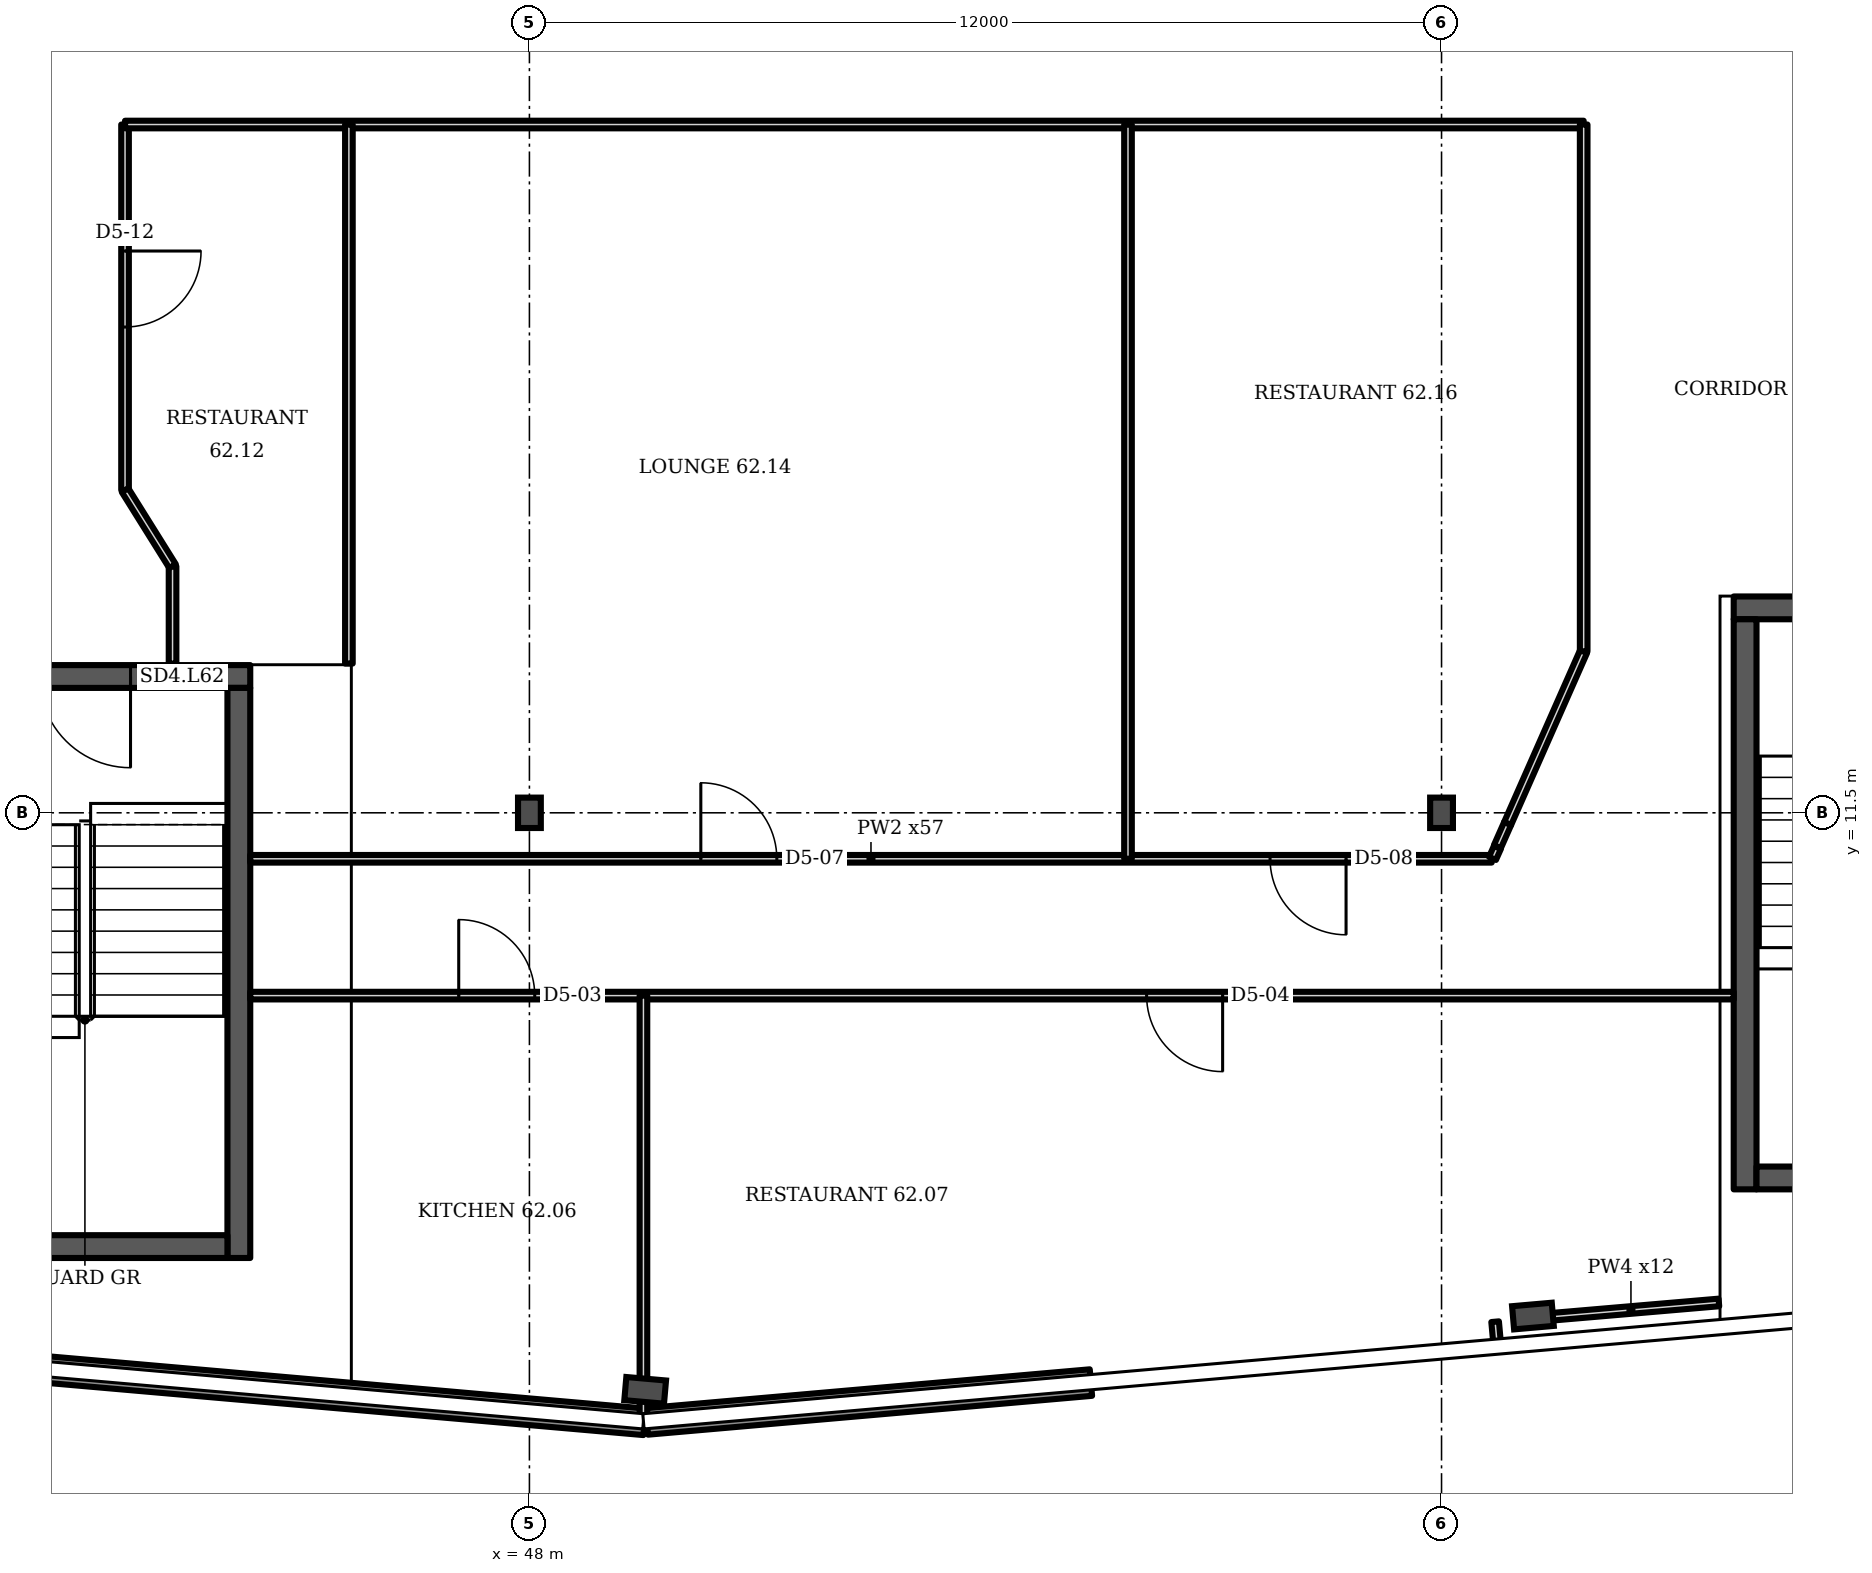
"""IFC4 building model, lengths in metres.
Left out: names, types, materials, properties, quantities, classifications, styles, units other than length and angle.
Written with IfcOpenShell. Run it as: python <this file> out.ifc"""

import sys

from ifc_helpers import new_model, si_unit, direction, frame, frame_2d, origin, origin_2d, place, context, subcontext, project, spatial, rectangle, i_section, extrude, element, fill, save


model = new_model("IFC4")
c1 = context("Model", 3, precision=1e-05, world=origin(), true_north=direction((0.0, 1.0)))
c2 = subcontext(c1, "Body", "Model", "MODEL_VIEW")
j1 = project(units=[si_unit("LENGTHUNIT", "METRE"), si_unit("PLANEANGLEUNIT", "RADIAN")], contexts=[c1])
p1 = place(None, origin())
s1 = spatial("IfcSite", under=j1, at=p1, CompositionType="ELEMENT")
p2 = place(p1, origin())
s2 = spatial("IfcBuilding", under=s1, at=p2, CompositionType="ELEMENT")
p3 = place(p2, frame((0.0, 0.0, 246.7)))
s3 = spatial("IfcBuildingStorey", under=s2, at=p3, CompositionType="ELEMENT", Elevation=246.7)
for number, where, z_axis, x_axis in (
    (1, (49.523, 3.902, 0.0), (0.0, 0.0, 1.0), (-0.087, -0.996, 0.0)),
    (2, (61.202, 4.879, 0.0), (0.0, 0.0, 1.0), (0.087, -0.996, 0.0)),
):
    element("IfcColumn", number, at=place(p3, frame(where, z_axis=z_axis, x_axis=x_axis)), inside=s3, PredefinedType="COLUMN", context=c2, shape_type="SweptSolid", body=[
        extrude(i_section(OverallWidth=0.306, OverallDepth=0.524, WebThickness=0.021, FlangeThickness=0.04, FilletRadius=0.027, at=origin_2d()), origin(), (0.0, 0.0, 1.0), 3.6),
    ])
for number, where, z_axis, x_axis in (
    (3, (48.0, 11.5, 0.0), (0.0, 0.0, 1.0), (1.0, 0.0, 0.0)),
    (4, (60.0, 11.5, 0.0), (0.0, 0.0, 1.0), (1.0, 0.0, 0.0)),
):
    element("IfcColumn", number, at=place(p3, frame(where, z_axis=z_axis, x_axis=x_axis)), inside=s3, PredefinedType="COLUMN", context=c2, shape_type="SweptSolid", body=[
        extrude(i_section(OverallWidth=0.3, OverallDepth=0.4, WebThickness=0.013, FlangeThickness=0.024, FilletRadius=0.027, at=origin_2d()), origin(), (0.0, 0.0, 1.0), 3.6),
    ])
p4 = place(p3, frame((37.729, 4.519, 0.0), z_axis=(0.0, 0.0, 1.0), x_axis=(0.99619, -0.087167, 0.0)))
e5 = element("IfcWall", 5, at=p4, inside=s3, PredefinedType="SOLIDWALL", context=c2, shape_type="SweptSolid", body=[
    extrude(rectangle(XDim=11.831, YDim=0.35, at=frame_2d((5.915, 0.0))), origin(), (0.0, 0.0, 1.0), 1.0),
])
p5 = place(p3, frame((49.545, 3.493, 0.0), z_axis=(0.0, 0.0, 1.0), x_axis=(0.996196, 0.087138, 0.0)))
e6 = element("IfcWall", 6, at=p5, inside=s3, PredefinedType="SOLIDWALL", context=c2, shape_type="SweptSolid", body=[
    extrude(rectangle(XDim=5.864, YDim=0.35, at=frame_2d((2.932, 0.0))), origin(), (0.0, 0.0, 1.0), 1.0),
])
p6 = place(p3, frame((39.977, 13.293, 0.0), z_axis=(0.0, 0.0, 1.0), x_axis=(1.0, 0.0, 0.0)))
e7 = element("IfcWall", 7, at=p6, inside=s3, PredefinedType="SHEAR", context=c2, shape_type="SweptSolid", body=[
    extrude(rectangle(XDim=4.35, YDim=0.3, at=frame_2d((2.175, 0.0))), origin(), (0.0, 0.0, 1.0), 3.2),
])
p7 = place(p6, frame((1.575, 0.0, 0.0)))
e8 = element("IfcOpeningElement", 8, at=p7, cuts=e7, PredefinedType="OPENING", context=c2, shape_type="SweptSolid", body=[
    extrude(rectangle(XDim=1.2, YDim=2.1, at=frame_2d((0.6, 1.05))), frame((0.0, 0.16, 0.0), z_axis=(0.0, -1.0, 0.0), x_axis=(1.0, 0.0, 0.0)), (0.0, 0.0, 1.0), 0.32),
])
p8 = place(p3, frame((63.844, 14.196, 0.0), z_axis=(0.0, 0.0, 1.0), x_axis=(1.0, 0.0, 0.0)))
e9 = element("IfcWall", 9, at=p8, inside=s3, PredefinedType="SHEAR", context=c2, shape_type="SweptSolid", body=[
    extrude(rectangle(XDim=4.35, YDim=0.3, at=frame_2d((2.175, 0.0))), origin(), (0.0, 0.0, 1.0), 3.2),
])
p9 = place(p8, frame((1.575, 0.0, 0.0)))
e10 = element("IfcOpeningElement", 10, at=p9, cuts=e9, PredefinedType="OPENING", context=c2, shape_type="SweptSolid", body=[
    extrude(rectangle(XDim=1.2, YDim=2.1, at=frame_2d((0.6, 1.05))), frame((0.0, 0.16, 0.0), z_axis=(0.0, -1.0, 0.0), x_axis=(1.0, 0.0, 0.0)), (0.0, 0.0, 1.0), 0.32),
])
p10 = place(p3, frame((42.68, 15.745, 0.0), z_axis=(0.0, 0.0, 1.0), x_axis=(0.0, 1.0, 0.0)))
e11 = element("IfcWall", 11, at=p10, inside=s3, PredefinedType="PARTITIONING", context=c2, shape_type="SweptSolid", body=[
    extrude(rectangle(XDim=4.81, YDim=0.1, at=frame_2d((2.405, 0.0))), origin(), (0.0, 0.0, 1.0), 3.2),
])
p11 = place(p10, frame((2.146, 0.0, 0.0)))
e12 = element("IfcOpeningElement", 12, at=p11, cuts=e11, PredefinedType="OPENING", context=c2, shape_type="SweptSolid", body=[
    extrude(rectangle(XDim=1.0, YDim=2.1, at=frame_2d((0.5, 1.05))), frame((0.0, 0.06, 0.0), z_axis=(0.0, -1.0, 0.0), x_axis=(1.0, 0.0, 0.0)), (0.0, 0.0, 1.0), 0.12),
])
p12 = place(p3, frame((42.68, 20.555, 0.0), z_axis=(0.0, 0.0, 1.0), x_axis=(1.0, 0.0, 0.0)))
e13 = element("IfcWall", 13, at=p12, inside=s3, PredefinedType="PARTITIONING", context=c2, shape_type="SweptSolid", body=[
    extrude(rectangle(XDim=19.19, YDim=0.1, at=frame_2d((9.595, 0.0))), origin(), (0.0, 0.0, 1.0), 3.2),
])
p13 = place(p3, frame((43.305, 13.463, 0.0), z_axis=(0.0, 0.0, 1.0), x_axis=(0.0, 1.0, 0.0)))
e14 = element("IfcWall", 14, at=p13, inside=s3, PredefinedType="PARTITIONING", context=c2, shape_type="SweptSolid", body=[
    extrude(rectangle(XDim=1.282, YDim=0.1, at=frame_2d((0.641, 0.0))), origin(), (0.0, 0.0, 1.0), 3.2),
])
p14 = place(p3, frame((43.305, 14.745, 0.0), z_axis=(0.0, 0.0, 1.0), x_axis=(-0.53, 0.848, 0.0)))
e15 = element("IfcWall", 15, at=p14, inside=s3, PredefinedType="PARTITIONING", context=c2, shape_type="SweptSolid", body=[
    extrude(rectangle(XDim=1.179, YDim=0.1, at=frame_2d((0.59, 0.0))), origin(), (0.0, 0.0, 1.0), 3.2),
])
p15 = place(p3, frame((44.327, 9.095, 0.0), z_axis=(0.0, 0.0, 1.0), x_axis=(1.0, 0.0, 0.0)))
e16 = element("IfcWall", 16, at=p15, inside=s3, PredefinedType="PARTITIONING", context=c2, shape_type="SweptSolid", body=[
    extrude(rectangle(XDim=19.517, YDim=0.1, at=frame_2d((9.758, 0.0))), origin(), (0.0, 0.0, 1.0), 3.2),
])
p16 = place(p15, frame((2.743, 0.0, 0.0)))
e17 = element("IfcOpeningElement", 17, at=p16, cuts=e16, PredefinedType="OPENING", context=c2, shape_type="SweptSolid", body=[
    extrude(rectangle(XDim=1.0, YDim=2.1, at=frame_2d((0.5, 1.05))), frame((0.0, 0.06, 0.0), z_axis=(0.0, -1.0, 0.0), x_axis=(1.0, 0.0, 0.0)), (0.0, 0.0, 1.0), 0.12),
])
p17 = place(p15, frame((11.793, 0.0, 0.0)))
e18 = element("IfcOpeningElement", 18, at=p17, cuts=e16, PredefinedType="OPENING", context=c2, shape_type="SweptSolid", body=[
    extrude(rectangle(XDim=1.0, YDim=2.1, at=frame_2d((0.5, 1.05))), frame((0.0, 0.06, 0.0), z_axis=(0.0, -1.0, 0.0), x_axis=(1.0, 0.0, 0.0)), (0.0, 0.0, 1.0), 0.12),
])
p18 = place(p3, frame((44.327, 10.895, 0.0), z_axis=(0.0, 0.0, 1.0), x_axis=(1.0, 0.0, 0.0)))
e19 = element("IfcWall", 19, at=p18, inside=s3, PredefinedType="PARTITIONING", context=c2, shape_type="SweptSolid", body=[
    extrude(rectangle(XDim=16.333, YDim=0.1, at=frame_2d((8.167, 0.0))), origin(), (0.0, 0.0, 1.0), 3.2),
])
p19 = place(p18, frame((5.928, 0.0, 0.0)))
e20 = element("IfcOpeningElement", 20, at=p19, cuts=e19, PredefinedType="OPENING", context=c2, shape_type="SweptSolid", body=[
    extrude(rectangle(XDim=1.0, YDim=2.1, at=frame_2d((0.5, 1.05))), frame((0.0, 0.06, 0.0), z_axis=(0.0, -1.0, 0.0), x_axis=(1.0, 0.0, 0.0)), (0.0, 0.0, 1.0), 0.12),
])
p20 = place(p18, frame((13.417, 0.0, 0.0)))
e21 = element("IfcOpeningElement", 21, at=p20, cuts=e19, PredefinedType="OPENING", context=c2, shape_type="SweptSolid", body=[
    extrude(rectangle(XDim=1.0, YDim=2.1, at=frame_2d((0.5, 1.05))), frame((0.0, 0.06, 0.0), z_axis=(0.0, -1.0, 0.0), x_axis=(1.0, 0.0, 0.0)), (0.0, 0.0, 1.0), 0.12),
])
p21 = place(p3, frame((45.625, 13.463, 0.0), z_axis=(0.0, 0.0, 1.0), x_axis=(0.0, 1.0, 0.0)))
e22 = element("IfcWall", 22, at=p21, inside=s3, PredefinedType="PARTITIONING", context=c2, shape_type="SweptSolid", body=[
    extrude(rectangle(XDim=7.092, YDim=0.1, at=frame_2d((3.546, 0.0))), origin(), (0.0, 0.0, 1.0), 3.2),
])
p22 = place(p3, frame((49.5, 3.514, 0.0), z_axis=(0.0, 0.0, 1.0), x_axis=(0.0, 1.0, 0.0)))
e23 = element("IfcWall", 23, at=p22, inside=s3, PredefinedType="PARTITIONING", context=c2, shape_type="SweptSolid", body=[
    extrude(rectangle(XDim=5.581, YDim=0.1, at=frame_2d((2.791, 0.0))), origin(), (0.0, 0.0, 1.0), 3.2),
])
p23 = place(p3, frame((55.875, 10.895, 0.0), z_axis=(0.0, 0.0, 1.0), x_axis=(0.0, 1.0, 0.0)))
e24 = element("IfcWall", 24, at=p23, inside=s3, PredefinedType="PARTITIONING", context=c2, shape_type="SweptSolid", body=[
    extrude(rectangle(XDim=9.66, YDim=0.1, at=frame_2d((4.83, 0.0))), origin(), (0.0, 0.0, 1.0), 3.2),
])
p24 = place(p3, frame((60.67, 10.9, 0.0), z_axis=(0.0, 0.0, 1.0), x_axis=(0.409983, 0.912097, 0.0)))
e25 = element("IfcWall", 25, at=p24, inside=s3, PredefinedType="PARTITIONING", context=c2, shape_type="SweptSolid", body=[
    extrude(rectangle(XDim=0.159, YDim=0.1, at=frame_2d((0.08, 0.0))), origin(), (0.0, 0.0, 1.0), 3.2),
])
p25 = place(p3, frame((60.733, 4.497, 0.0), z_axis=(0.0, 0.0, 1.0), x_axis=(-0.090037, 0.995936, 0.0)))
e26 = element("IfcWall", 26, at=p25, inside=s3, PredefinedType="PARTITIONING", context=c2, shape_type="SweptSolid", body=[
    extrude(rectangle(XDim=0.309, YDim=0.1, at=frame_2d((0.155, 0.0))), origin(), (0.0, 0.0, 1.0), 3.2),
])
p26 = place(p3, frame((60.735, 11.055, 0.0), z_axis=(0.0, 0.0, 1.0), x_axis=(0.404577, 0.914505, 0.0)))
e27 = element("IfcWall", 27, at=p26, inside=s3, PredefinedType="PARTITIONING", context=c2, shape_type="SweptSolid", body=[
    extrude(rectangle(XDim=0.334, YDim=0.1, at=frame_2d((0.167, 0.0))), origin(), (0.0, 0.0, 1.0), 3.2),
])
p27 = place(p3, frame((60.87, 11.36, 0.0), z_axis=(0.0, 0.0, 1.0), x_axis=(0.403903, 0.914797, 0.0)))
e28 = element("IfcWall", 28, at=p27, inside=s3, PredefinedType="PARTITIONING", context=c2, shape_type="SweptSolid", body=[
    extrude(rectangle(XDim=2.476, YDim=0.1, at=frame_2d((1.238, 0.0))), origin(), (0.0, 0.0, 1.0), 3.2),
])
p28 = place(p3, frame((61.335, 4.86, 0.0), z_axis=(0.0, 0.0, 1.0), x_axis=(0.996359, 0.085264, 0.0)))
e29 = element("IfcWall", 29, at=p28, inside=s3, PredefinedType="PARTITIONING", context=c2, shape_type="SweptSolid", body=[
    extrude(rectangle(XDim=2.322, YDim=0.1, at=frame_2d((1.161, 0.0))), origin(), (0.0, 0.0, 1.0), 2.58),
])
p29 = place(p3, frame((61.87, 13.625, 0.0), z_axis=(0.0, 0.0, 1.0), x_axis=(0.0, 1.0, 0.0)))
e30 = element("IfcWall", 30, at=p29, inside=s3, PredefinedType="PARTITIONING", context=c2, shape_type="SweptSolid", body=[
    extrude(rectangle(XDim=6.93, YDim=0.1, at=frame_2d((3.465, 0.0))), origin(), (0.0, 0.0, 1.0), 3.2),
])
p30 = place(p3, frame((44.177, 5.643, 0.0), z_axis=(0.0, 0.0, 1.0), x_axis=(0.0, 1.0, 0.0)))
e31 = element("IfcWall", 31, at=p30, inside=s3, PredefinedType="SHEAR", context=c2, shape_type="SweptSolid", body=[
    extrude(rectangle(XDim=7.5, YDim=0.3, at=frame_2d((3.75, 0.0))), origin(), (0.0, 0.0, 1.0), 3.2),
])
p31 = place(p3, frame((40.277, 5.793, 0.0), z_axis=(0.0, 0.0, 1.0), x_axis=(1.0, 0.0, 0.0)))
e32 = element("IfcWall", 32, at=p31, inside=s3, PredefinedType="SHEAR", context=c2, shape_type="SweptSolid", body=[
    extrude(rectangle(XDim=3.75, YDim=0.3, at=frame_2d((1.875, 0.0))), origin(), (0.0, 0.0, 1.0), 3.2),
])
p32 = place(p3, frame((63.994, 6.546, 0.0), z_axis=(0.0, 0.0, 1.0), x_axis=(0.0, 1.0, 0.0)))
e33 = element("IfcWall", 33, at=p32, inside=s3, PredefinedType="SHEAR", context=c2, shape_type="SweptSolid", body=[
    extrude(rectangle(XDim=7.5, YDim=0.3, at=frame_2d((3.75, 0.0))), origin(), (0.0, 0.0, 1.0), 3.2),
])
p33 = place(p3, frame((64.144, 6.696, 0.0), z_axis=(0.0, 0.0, 1.0), x_axis=(1.0, 0.0, 0.0)))
e34 = element("IfcWall", 34, at=p33, inside=s3, PredefinedType="SHEAR", context=c2, shape_type="SweptSolid", body=[
    extrude(rectangle(XDim=3.75, YDim=0.3, at=frame_2d((1.875, 0.0))), origin(), (0.0, 0.0, 1.0), 3.2),
])
p34 = place(p7, origin())
e35 = element("IfcDoor", 35, at=p34, inside=s3, OperationType="SINGLE_SWING_RIGHT", PredefinedType="DOOR", context=c2, shape_type="SweptSolid", body=[
    extrude(rectangle(XDim=1.2, YDim=2.1, at=frame_2d((0.6, 1.05))), frame((0.0, 0.025, 0.0), z_axis=(0.0, -1.0, 0.0), x_axis=(1.0, 0.0, 0.0)), (0.0, 0.0, 1.0), 0.05),
])
fill(e8, e35)
p35 = place(p16, origin())
e36 = element("IfcDoor", 36, at=p35, inside=s3, OperationType="SINGLE_SWING_LEFT", PredefinedType="DOOR", context=c2, shape_type="SweptSolid", body=[
    extrude(rectangle(XDim=1.0, YDim=2.1, at=frame_2d((0.5, 1.05))), frame((0.0, 0.025, 0.0), z_axis=(0.0, -1.0, 0.0), x_axis=(1.0, 0.0, 0.0)), (0.0, 0.0, 1.0), 0.05),
])
fill(e17, e36)
p36 = place(p17, origin())
e37 = element("IfcDoor", 37, at=p36, inside=s3, OperationType="SINGLE_SWING_RIGHT", PredefinedType="DOOR", context=c2, shape_type="SweptSolid", body=[
    extrude(rectangle(XDim=1.0, YDim=2.1, at=frame_2d((0.5, 1.05))), frame((0.0, 0.025, 0.0), z_axis=(0.0, -1.0, 0.0), x_axis=(1.0, 0.0, 0.0)), (0.0, 0.0, 1.0), 0.05),
])
fill(e18, e37)
p37 = place(p19, origin())
e38 = element("IfcDoor", 38, at=p37, inside=s3, OperationType="SINGLE_SWING_LEFT", PredefinedType="DOOR", context=c2, shape_type="SweptSolid", body=[
    extrude(rectangle(XDim=1.0, YDim=2.1, at=frame_2d((0.5, 1.05))), frame((0.0, 0.025, 0.0), z_axis=(0.0, -1.0, 0.0), x_axis=(1.0, 0.0, 0.0)), (0.0, 0.0, 1.0), 0.05),
])
fill(e20, e38)
p38 = place(p20, origin())
e39 = element("IfcDoor", 39, at=p38, inside=s3, OperationType="SINGLE_SWING_RIGHT", PredefinedType="DOOR", context=c2, shape_type="SweptSolid", body=[
    extrude(rectangle(XDim=1.0, YDim=2.1, at=frame_2d((0.5, 1.05))), frame((0.0, 0.025, 0.0), z_axis=(0.0, -1.0, 0.0), x_axis=(1.0, 0.0, 0.0)), (0.0, 0.0, 1.0), 0.05),
])
fill(e21, e39)
p39 = place(p11, origin())
e40 = element("IfcDoor", 40, at=p39, inside=s3, OperationType="SINGLE_SWING_RIGHT", PredefinedType="DOOR", context=c2, shape_type="SweptSolid", body=[
    extrude(rectangle(XDim=1.0, YDim=2.1, at=frame_2d((0.5, 1.05))), frame((0.0, 0.025, 0.0), z_axis=(0.0, -1.0, 0.0), x_axis=(1.0, 0.0, 0.0)), (0.0, 0.0, 1.0), 0.05),
])
fill(e12, e40)
save(model, sys.argv[1])
